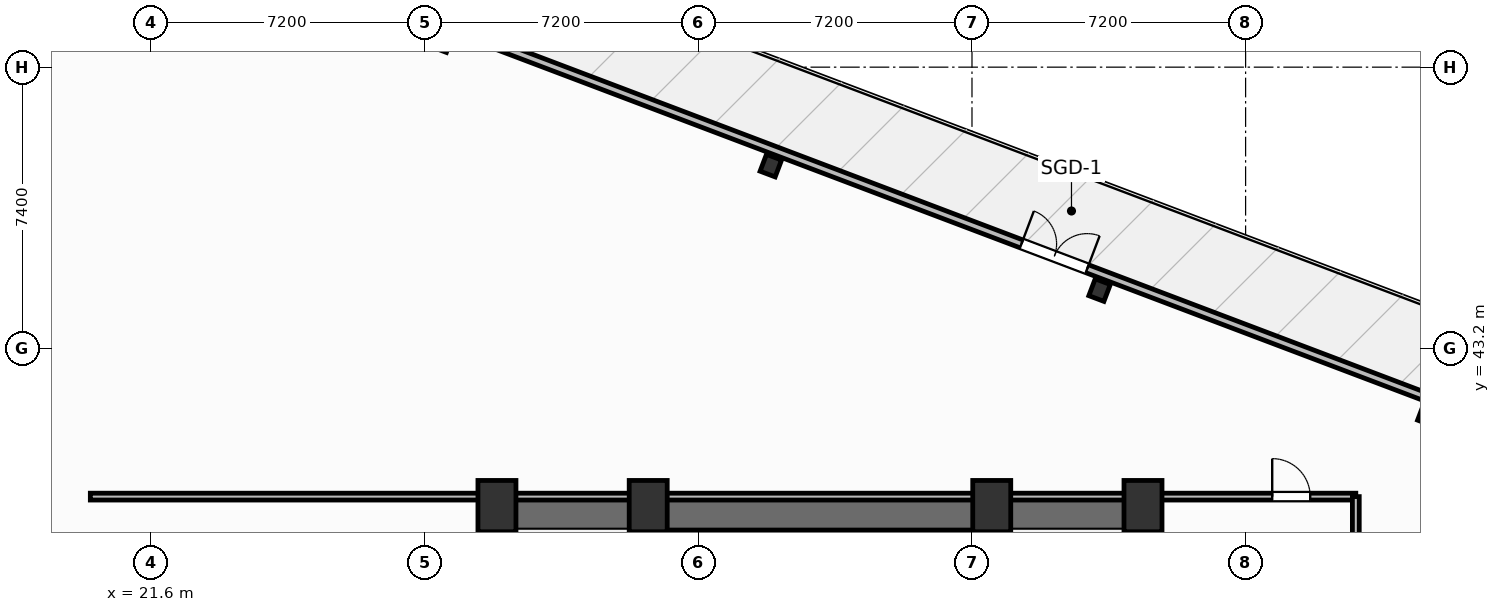
"""IFC4 building model, lengths in metres.
Left out: names, types, materials, properties, quantities, classifications, styles, units other than length and angle.
Written with IfcOpenShell. Run it as: python <this file> out.ifc"""

import sys

from ifc_helpers import new_model, si_unit, direction, frame, frame_2d, origin, origin_2d, place, context, subcontext, project, spatial, rectangle, i_section, extrude, element, fill, save


model = new_model("IFC4")
c1 = context("Model", 3, precision=1e-05, world=origin(), true_north=direction((0.0, 1.0)))
c2 = subcontext(c1, "Body", "Model", "MODEL_VIEW")
j1 = project(units=[si_unit("LENGTHUNIT", "METRE"), si_unit("PLANEANGLEUNIT", "RADIAN")], contexts=[c1])
p1 = place(None, origin())
s1 = spatial("IfcSite", under=j1, at=p1, CompositionType="ELEMENT")
p2 = place(p1, origin())
s2 = spatial("IfcBuilding", under=s1, at=p2, CompositionType="ELEMENT")
p3 = place(p2, frame((0.0, 0.0, 71.4)))
s3 = spatial("IfcBuildingStorey", under=s2, at=p3, CompositionType="ELEMENT", Elevation=71.4)
for number, where, z_axis, x_axis in (
    (1, (30.7, 39.05, 0.0), (0.0, 0.0, 1.0), (1.0, 0.0, 0.0)),
    (2, (34.68, 39.05, 0.0), (0.0, 0.0, 1.0), (1.0, 0.0, 0.0)),
    (3, (43.72, 39.05, 0.0), (0.0, 0.0, 1.0), (1.0, 0.0, 0.0)),
    (4, (47.7, 39.05, 0.0), (0.0, 0.0, 1.0), (1.0, 0.0, 0.0)),
):
    element("IfcColumn", number, at=place(p3, frame(where, z_axis=z_axis, x_axis=x_axis)), inside=s3, PredefinedType="COLUMN", context=c2, shape_type="SweptSolid", body=[
        extrude(rectangle(XDim=1.0, YDim=1.35, at=origin_2d()), origin(), (0.0, 0.0, 1.0), 4.8),
    ])
p4 = place(p3, frame((30.28, 38.845, 0.0), z_axis=(0.0, 0.0, 1.0), x_axis=(1.0, 0.0, 0.0)))
e5 = element("IfcWall", 5, at=p4, inside=s3, PredefinedType="SHEAR", context=c2, shape_type="SweptSolid", body=[
    extrude(rectangle(XDim=17.84, YDim=0.85, at=frame_2d((8.92, 0.0))), origin(), (0.0, 0.0, 1.0), 4.55),
])
for number, where, z_axis, x_axis in (
    (6, (30.705, 29.2, 0.0), (0.0, 0.0, 1.0), (0.0, 1.0, 0.0)),
    (7, (47.695, 29.2, 0.0), (0.0, 0.0, 1.0), (0.0, 1.0, 0.0)),
):
    element("IfcWall", number, at=place(p3, frame(where, z_axis=z_axis, x_axis=x_axis)), inside=s3, PredefinedType="SHEAR", context=c2, shape_type="SweptSolid", body=[
        extrude(rectangle(XDim=9.22, YDim=0.85, at=frame_2d((4.61, 0.0))), origin(), (0.0, 0.0, 1.0), 4.55),
    ])
p5 = place(p3, frame((34.64, 29.2, 0.0), z_axis=(0.0, 0.0, 1.0), x_axis=(0.0, 1.0, 0.0)))
e8 = element("IfcWall", 8, at=p5, inside=s3, PredefinedType="SHEAR", context=c2, shape_type="SweptSolid", body=[
    extrude(rectangle(XDim=9.22, YDim=0.25, at=frame_2d((4.61, 0.0))), origin(), (0.0, 0.0, 1.0), 4.55),
])
p6 = place(p5, frame((0.65, 0.0, 0.0)))
e9 = element("IfcOpeningElement", 9, at=p6, cuts=e8, PredefinedType="OPENING", context=c2, shape_type="SweptSolid", body=[
    extrude(rectangle(XDim=1.05, YDim=2.15, at=frame_2d((0.525, 1.075))), frame((0.0, 0.135, 0.0), z_axis=(0.0, -1.0, 0.0), x_axis=(1.0, 0.0, 0.0)), (0.0, 0.0, 1.0), 0.27),
])
p7 = place(p3, frame((43.76, 29.2, 0.0), z_axis=(0.0, 0.0, 1.0), x_axis=(0.0, 1.0, 0.0)))
e10 = element("IfcWall", 10, at=p7, inside=s3, PredefinedType="SHEAR", context=c2, shape_type="SweptSolid", body=[
    extrude(rectangle(XDim=9.22, YDim=0.25, at=frame_2d((4.61, 0.0))), origin(), (0.0, 0.0, 1.0), 4.55),
])
p8 = place(p7, frame((0.65, 0.0, 0.0)))
e11 = element("IfcOpeningElement", 11, at=p8, cuts=e10, PredefinedType="OPENING", context=c2, shape_type="SweptSolid", body=[
    extrude(rectangle(XDim=1.05, YDim=2.15, at=frame_2d((0.525, 1.075))), frame((0.0, 0.135, 0.0), z_axis=(0.0, -1.0, 0.0), x_axis=(1.0, 0.0, 0.0)), (0.0, 0.0, 1.0), 0.27),
])
for number, where, z_axis, x_axis in (
    (12, (55.208, 41.459, -0.32), (0.0, 0.0, 1.0), (0.935, -0.354, 0.0)),
    (13, (46.557, 44.734, -0.32), (0.0, 0.0, 1.0), (0.935, -0.354, 0.0)),
    (14, (37.906, 48.009, -0.32), (0.0, 0.0, 1.0), (0.935, -0.354, 0.0)),
    (15, (29.256, 51.284, -0.32), (0.0, 0.0, 1.0), (0.935, -0.354, 0.0)),
):
    element("IfcColumn", number, at=place(p3, frame(where, z_axis=z_axis, x_axis=x_axis)), inside=s3, PredefinedType="COLUMN", context=c2, shape_type="SweptSolid", body=[
        extrude(i_section(OverallWidth=0.424, OverallDepth=0.474, WebThickness=0.048, FlangeThickness=0.077, FilletRadius=0.025, at=origin_2d()), origin(), (0.0, 0.0, 1.0), 5.12),
    ])
p9 = place(p3, frame((18.646, 55.739, 0.0), z_axis=(0.0, 0.0, 1.0), x_axis=(0.935222250741, -0.354061211825, 0.0)))
e16 = element("IfcWall", 16, at=p9, inside=s3, PredefinedType="SOLIDWALL", context=c2, shape_type="SweptSolid", body=[
    extrude(rectangle(XDim=60.0, YDim=0.22, at=frame_2d((30.0, 0.0))), origin(), (0.0, 0.0, 1.0), 3.83),
])
p10 = place(p9, frame((27.647, 0.0, 0.0)))
e17 = element("IfcOpeningElement", 17, at=p10, cuts=e16, PredefinedType="OPENING", context=c2, shape_type="SweptSolid", body=[
    extrude(rectangle(XDim=1.85, YDim=2.3, at=frame_2d((0.925, 1.15))), frame((0.0, 0.12, 0.0), z_axis=(0.0, -1.0, 0.0), x_axis=(1.0, 0.0, 0.0)), (0.0, 0.0, 1.0), 0.24),
])
p11 = place(p9, frame((0.55, 0.0, 0.75)))
e18 = element("IfcOpeningElement", 18, at=p11, cuts=e16, PredefinedType="OPENING", context=c2, shape_type="SweptSolid", body=[
    extrude(rectangle(XDim=1.65, YDim=1.65, at=frame_2d((0.825, 0.825))), frame((0.0, 0.12, 0.0), z_axis=(0.0, -1.0, 0.0), x_axis=(1.0, 0.0, 0.0)), (0.0, 0.0, 1.0), 0.24),
])
p12 = place(p9, frame((57.8, 0.0, 0.75)))
e19 = element("IfcOpeningElement", 19, at=p12, cuts=e16, PredefinedType="OPENING", context=c2, shape_type="SweptSolid", body=[
    extrude(rectangle(XDim=1.65, YDim=1.65, at=frame_2d((0.825, 0.825))), frame((0.0, 0.12, 0.0), z_axis=(0.0, -1.0, 0.0), x_axis=(1.0, 0.0, 0.0)), (0.0, 0.0, 1.0), 0.24),
])
p13 = place(p3, frame((20.0, 39.3, 0.0), z_axis=(0.0, 0.0, 1.0), x_axis=(1.0, 0.0, 0.0)))
e20 = element("IfcWall", 20, at=p13, inside=s3, PredefinedType="PARTITIONING", context=c2, shape_type="SweptSolid", body=[
    extrude(rectangle(XDim=33.3, YDim=0.18, at=frame_2d((16.65, 0.0))), origin(), (0.0, 0.0, 1.0), 3.68),
])
p14 = place(p13, frame((31.1, 0.0, 0.0)))
e21 = element("IfcOpeningElement", 21, at=p14, cuts=e20, PredefinedType="OPENING", context=c2, shape_type="SweptSolid", body=[
    extrude(rectangle(XDim=1.0, YDim=2.05, at=frame_2d((0.5, 1.025))), frame((0.0, 0.1, 0.0), z_axis=(0.0, -1.0, 0.0), x_axis=(1.0, 0.0, 0.0)), (0.0, 0.0, 1.0), 0.2),
])
p15 = place(p3, frame((53.3, 29.02, 0.0), z_axis=(0.0, 0.0, 1.0), x_axis=(0.0, 1.0, 0.0)))
e22 = element("IfcWall", 22, at=p15, inside=s3, PredefinedType="PARTITIONING", context=c2, shape_type="SweptSolid", body=[
    extrude(rectangle(XDim=10.28, YDim=0.18, at=frame_2d((5.14, 0.0))), origin(), (0.0, 0.0, 1.0), 4.55),
])
p16 = place(p10, origin())
e23 = element("IfcDoor", 23, at=p16, inside=s3, OperationType="DOUBLE_DOOR_SINGLE_SWING", PredefinedType="DOOR", context=c2, shape_type="SweptSolid", body=[
    extrude(rectangle(XDim=1.85, YDim=2.3, at=frame_2d((0.925, 1.15))), frame((0.0, 0.025, 0.0), z_axis=(0.0, -1.0, 0.0), x_axis=(1.0, 0.0, 0.0)), (0.0, 0.0, 1.0), 0.05),
])
fill(e17, e23)
p17 = place(p14, origin())
e24 = element("IfcDoor", 24, at=p17, inside=s3, OperationType="SINGLE_SWING_LEFT", PredefinedType="DOOR", context=c2, shape_type="SweptSolid", body=[
    extrude(rectangle(XDim=1.0, YDim=2.05, at=frame_2d((0.5, 1.025))), frame((0.0, 0.025, 0.0), z_axis=(0.0, -1.0, 0.0), x_axis=(1.0, 0.0, 0.0)), (0.0, 0.0, 1.0), 0.05),
])
fill(e21, e24)
save(model, sys.argv[1])
